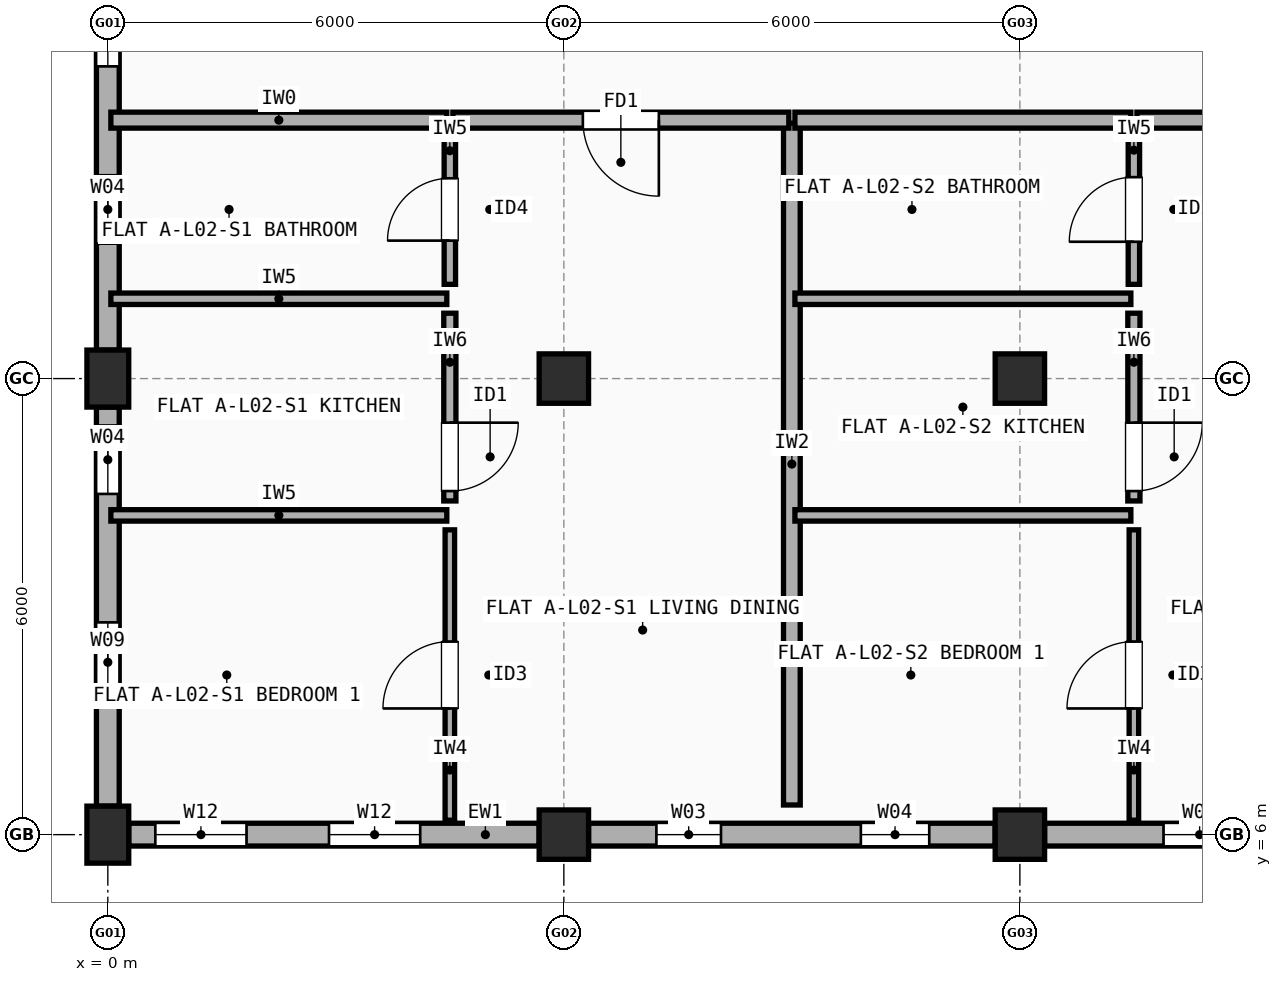
"""IFC4 building model, lengths in metres.
Left out: names, types, materials, properties, quantities, classifications, styles, units other than length and angle.
Written with IfcOpenShell. Run it as: python <this file> out.ifc"""

import sys

from ifc_helpers import new_model, si_unit, direction, frame, frame_2d, origin, origin_2d, place, context, subcontext, project, spatial, rectangle, extrude, element, fill, save


model = new_model("IFC4")
c1 = context("Model", 3, precision=1e-05, world=origin(), true_north=direction((0.0, 1.0)))
c2 = subcontext(c1, "Body", "Model", "MODEL_VIEW")
j1 = project(units=[si_unit("LENGTHUNIT", "METRE"), si_unit("PLANEANGLEUNIT", "RADIAN")], contexts=[c1])
p1 = place(None, origin())
s1 = spatial("IfcSite", under=j1, at=p1, CompositionType="ELEMENT")
p2 = place(p1, origin())
s2 = spatial("IfcBuilding", under=s1, at=p2, CompositionType="ELEMENT")
p3 = place(p2, frame((0.0, 0.0, 7.7)))
s3 = spatial("IfcBuildingStorey", under=s2, at=p3, CompositionType="ELEMENT", Elevation=7.7)
for number, where, z_axis, x_axis in (
    (1, (0.0, 6.0, 0.0), (0.0, 0.0, 1.0), (1.0, 0.0, 0.0)),
    (2, (0.0, 12.0, 0.0), (0.0, 0.0, 1.0), (1.0, 0.0, 0.0)),
):
    element("IfcColumn", number, at=place(p3, frame(where, z_axis=z_axis, x_axis=x_axis)), inside=s3, PredefinedType="COLUMN", context=c2, shape_type="SweptSolid", body=[
        extrude(rectangle(XDim=0.55, YDim=0.75, at=origin_2d()), origin(), (0.0, 0.0, 1.0), 2.955),
    ])
for number, where, z_axis, x_axis in (
    (3, (6.0, 6.0, 0.0), (0.0, 0.0, 1.0), (1.0, 0.0, 0.0)),
    (4, (6.0, 12.0, 0.0), (0.0, 0.0, 1.0), (1.0, 0.0, 0.0)),
    (5, (12.0, 6.0, 0.0), (0.0, 0.0, 1.0), (1.0, 0.0, 0.0)),
    (6, (12.0, 12.0, 0.0), (0.0, 0.0, 1.0), (1.0, 0.0, 0.0)),
):
    element("IfcColumn", number, at=place(p3, frame(where, z_axis=z_axis, x_axis=x_axis)), inside=s3, PredefinedType="COLUMN", context=c2, shape_type="SweptSolid", body=[
        extrude(rectangle(XDim=0.65, YDim=0.65, at=origin_2d()), origin(), (0.0, 0.0, 1.0), 2.955),
    ])
p4 = place(p3, frame((0.275, 6.0, 0.0), z_axis=(0.0, 0.0, 1.0), x_axis=(1.0, 0.0, 0.0)))
e7 = element("IfcWall", 7, at=p4, inside=s3, PredefinedType="STANDARD", context=c2, shape_type="SweptSolid", body=[
    extrude(rectangle(XDim=5.4, YDim=0.3, at=frame_2d((2.7, 0.0))), origin(), (0.0, 0.0, 1.0), 2.437),
])
p5 = place(p4, frame((0.35, 0.0, 0.9)))
e8 = element("IfcOpeningElement", 8, at=p5, cuts=e7, PredefinedType="OPENING", context=c2, shape_type="SweptSolid", body=[
    extrude(rectangle(XDim=1.2, YDim=1.35, at=frame_2d((0.6, 0.675))), frame((0.0, 0.16, 0.0), z_axis=(0.0, -1.0, 0.0), x_axis=(1.0, 0.0, 0.0)), (0.0, 0.0, 1.0), 0.32),
])
p6 = place(p4, frame((2.635, 0.0, 0.9)))
e9 = element("IfcOpeningElement", 9, at=p6, cuts=e7, PredefinedType="OPENING", context=c2, shape_type="SweptSolid", body=[
    extrude(rectangle(XDim=1.2, YDim=1.35, at=frame_2d((0.6, 0.675))), frame((0.0, 0.16, 0.0), z_axis=(0.0, -1.0, 0.0), x_axis=(1.0, 0.0, 0.0)), (0.0, 0.0, 1.0), 0.32),
])
p7 = place(p3, frame((6.325, 6.0, 0.0), z_axis=(0.0, 0.0, 1.0), x_axis=(1.0, 0.0, 0.0)))
e10 = element("IfcWall", 10, at=p7, inside=s3, PredefinedType="STANDARD", context=c2, shape_type="SweptSolid", body=[
    extrude(rectangle(XDim=5.35, YDim=0.3, at=frame_2d((2.675, 0.0))), origin(), (0.0, 0.0, 1.0), 2.437),
])
p8 = place(p7, frame((0.893, 0.0, 0.9)))
e11 = element("IfcOpeningElement", 11, at=p8, cuts=e10, PredefinedType="OPENING", context=c2, shape_type="SweptSolid", body=[
    extrude(rectangle(XDim=0.85, YDim=1.25, at=frame_2d((0.425, 0.625))), frame((0.0, 0.16, 0.0), z_axis=(0.0, -1.0, 0.0), x_axis=(1.0, 0.0, 0.0)), (0.0, 0.0, 1.0), 0.32),
])
p9 = place(p7, frame((3.583, 0.0, 0.9)))
e12 = element("IfcOpeningElement", 12, at=p9, cuts=e10, PredefinedType="OPENING", context=c2, shape_type="SweptSolid", body=[
    extrude(rectangle(XDim=0.9, YDim=1.3, at=frame_2d((0.45, 0.65))), frame((0.0, 0.16, 0.0), z_axis=(0.0, -1.0, 0.0), x_axis=(1.0, 0.0, 0.0)), (0.0, 0.0, 1.0), 0.32),
])
p10 = place(p3, frame((12.325, 6.0, 0.0), z_axis=(0.0, 0.0, 1.0), x_axis=(1.0, 0.0, 0.0)))
e13 = element("IfcWall", 13, at=p10, inside=s3, PredefinedType="STANDARD", context=c2, shape_type="SweptSolid", body=[
    extrude(rectangle(XDim=5.35, YDim=0.3, at=frame_2d((2.675, 0.0))), origin(), (0.0, 0.0, 1.0), 2.437),
])
p11 = place(p10, frame((1.565, 0.0, 0.9)))
e14 = element("IfcOpeningElement", 14, at=p11, cuts=e13, PredefinedType="OPENING", context=c2, shape_type="SweptSolid", body=[
    extrude(rectangle(XDim=0.95, YDim=1.35, at=frame_2d((0.475, 0.675))), frame((0.0, 0.16, 0.0), z_axis=(0.0, -1.0, 0.0), x_axis=(1.0, 0.0, 0.0)), (0.0, 0.0, 1.0), 0.32),
])
p12 = place(p10, frame((4.05, 0.0, 0.9)))
e15 = element("IfcOpeningElement", 15, at=p12, cuts=e13, PredefinedType="OPENING", context=c2, shape_type="SweptSolid", body=[
    extrude(rectangle(XDim=0.95, YDim=1.35, at=frame_2d((0.475, 0.675))), frame((0.0, 0.16, 0.0), z_axis=(0.0, -1.0, 0.0), x_axis=(1.0, 0.0, 0.0)), (0.0, 0.0, 1.0), 0.32),
])
p13 = place(p3, frame((0.0, 17.625, 0.0), z_axis=(0.0, 0.0, 1.0), x_axis=(0.0, -1.0, 0.0)))
e16 = element("IfcWall", 16, at=p13, inside=s3, PredefinedType="STANDARD", context=c2, shape_type="SweptSolid", body=[
    extrude(rectangle(XDim=5.25, YDim=0.3, at=frame_2d((2.625, 0.0))), origin(), (0.0, 0.0, 1.0), 2.437),
])
p14 = place(p13, frame((0.667, 0.0, 0.9)))
e17 = element("IfcOpeningElement", 17, at=p14, cuts=e16, PredefinedType="OPENING", context=c2, shape_type="SweptSolid", body=[
    extrude(rectangle(XDim=0.85, YDim=1.25, at=frame_2d((0.425, 0.625))), frame((0.0, 0.16, 0.0), z_axis=(0.0, -1.0, 0.0), x_axis=(1.0, 0.0, 0.0)), (0.0, 0.0, 1.0), 0.32),
])
p15 = place(p13, frame((2.95, 0.0, 0.9)))
e18 = element("IfcOpeningElement", 18, at=p15, cuts=e16, PredefinedType="OPENING", context=c2, shape_type="SweptSolid", body=[
    extrude(rectangle(XDim=0.9, YDim=1.3, at=frame_2d((0.45, 0.65))), frame((0.0, 0.16, 0.0), z_axis=(0.0, -1.0, 0.0), x_axis=(1.0, 0.0, 0.0)), (0.0, 0.0, 1.0), 0.32),
])
p16 = place(p3, frame((0.0, 11.625, 0.0), z_axis=(0.0, 0.0, 1.0), x_axis=(0.0, -1.0, 0.0)))
e19 = element("IfcWall", 19, at=p16, inside=s3, PredefinedType="STANDARD", context=c2, shape_type="SweptSolid", body=[
    extrude(rectangle(XDim=5.25, YDim=0.3, at=frame_2d((2.625, 0.0))), origin(), (0.0, 0.0, 1.0), 2.437),
])
p17 = place(p16, frame((0.242, 0.0, 0.9)))
e20 = element("IfcOpeningElement", 20, at=p17, cuts=e19, PredefinedType="OPENING", context=c2, shape_type="SweptSolid", body=[
    extrude(rectangle(XDim=0.9, YDim=1.3, at=frame_2d((0.45, 0.65))), frame((0.0, 0.16, 0.0), z_axis=(0.0, -1.0, 0.0), x_axis=(1.0, 0.0, 0.0)), (0.0, 0.0, 1.0), 0.32),
])
p18 = place(p16, frame((2.833, 0.0, 0.9)))
e21 = element("IfcOpeningElement", 21, at=p18, cuts=e19, PredefinedType="OPENING", context=c2, shape_type="SweptSolid", body=[
    extrude(rectangle(XDim=1.05, YDim=1.35, at=frame_2d((0.525, 0.675))), frame((0.0, 0.16, 0.0), z_axis=(0.0, -1.0, 0.0), x_axis=(1.0, 0.0, 0.0)), (0.0, 0.0, 1.0), 0.32),
])
p19 = place(p3, frame((9.0, 6.39, 0.0), z_axis=(0.0, 0.0, 1.0), x_axis=(0.0, 1.0, 0.0)))
e22 = element("IfcWall", 22, at=p19, inside=s3, PredefinedType="SOLIDWALL", context=c2, shape_type="SweptSolid", body=[
    extrude(rectangle(XDim=8.97, YDim=0.22, at=frame_2d((4.485, 0.0))), origin(), (0.0, 0.0, 1.0), 2.387),
])
p20 = place(p3, frame((0.04, 15.4, 0.0), z_axis=(0.0, 0.0, 1.0), x_axis=(1.0, 0.0, 0.0)))
e23 = element("IfcWall", 23, at=p20, inside=s3, PredefinedType="SOLIDWALL", context=c2, shape_type="SweptSolid", body=[
    extrude(rectangle(XDim=4.42, YDim=0.21, at=frame_2d((2.21, 0.0))), origin(), (0.0, 0.0, 1.0), 2.437),
])
p21 = place(p3, frame((4.54, 15.4, 0.0), z_axis=(0.0, 0.0, 1.0), x_axis=(1.0, 0.0, 0.0)))
e24 = element("IfcWall", 24, at=p21, inside=s3, PredefinedType="SOLIDWALL", context=c2, shape_type="SweptSolid", body=[
    extrude(rectangle(XDim=4.42, YDim=0.21, at=frame_2d((2.21, 0.0))), origin(), (0.0, 0.0, 1.0), 2.337),
])
p22 = place(p21, frame((1.71, 0.0, 0.0)))
e25 = element("IfcOpeningElement", 25, at=p22, cuts=e24, PredefinedType="OPENING", context=c2, shape_type="SweptSolid", body=[
    extrude(rectangle(XDim=1.0, YDim=2.15, at=frame_2d((0.5, 1.075))), frame((0.0, 0.115, 0.0), z_axis=(0.0, -1.0, 0.0), x_axis=(1.0, 0.0, 0.0)), (0.0, 0.0, 1.0), 0.23),
])
p23 = place(p3, frame((4.5, 6.19, 0.0), z_axis=(0.0, 0.0, 1.0), x_axis=(0.0, 1.0, 0.0)))
e26 = element("IfcWall", 26, at=p23, inside=s3, PredefinedType="PARTITIONING", context=c2, shape_type="SweptSolid", body=[
    extrude(rectangle(XDim=3.82, YDim=0.125, at=frame_2d((1.91, 0.0))), origin(), (0.0, 0.0, 1.0), 2.955),
])
p24 = place(p23, frame((1.47, 0.0, 0.0)))
e27 = element("IfcOpeningElement", 27, at=p24, cuts=e26, PredefinedType="OPENING", context=c2, shape_type="SweptSolid", body=[
    extrude(rectangle(XDim=0.88, YDim=2.1, at=frame_2d((0.44, 1.05))), frame((0.0, 0.073, 0.0), z_axis=(0.0, -1.0, 0.0), x_axis=(1.0, 0.0, 0.0)), (0.0, 0.0, 1.0), 0.145),
])
p25 = place(p3, frame((4.5, 10.39, 0.0), z_axis=(0.0, 0.0, 1.0), x_axis=(0.0, 1.0, 0.0)))
e28 = element("IfcWall", 28, at=p25, inside=s3, PredefinedType="PLUMBINGWALL", context=c2, shape_type="SweptSolid", body=[
    extrude(rectangle(XDim=2.47, YDim=0.16, at=frame_2d((1.235, 0.0))), origin(), (0.0, 0.0, 1.0), 2.387),
])
p26 = place(p25, frame((0.13, 0.0, 0.0)))
e29 = element("IfcOpeningElement", 29, at=p26, cuts=e28, PredefinedType="OPENING", context=c2, shape_type="SweptSolid", body=[
    extrude(rectangle(XDim=0.9, YDim=2.1, at=frame_2d((0.45, 1.05))), frame((0.0, 0.09, 0.0), z_axis=(0.0, -1.0, 0.0), x_axis=(1.0, 0.0, 0.0)), (0.0, 0.0, 1.0), 0.18),
])
p27 = place(p3, frame((4.5, 13.24, 0.0), z_axis=(0.0, 0.0, 1.0), x_axis=(0.0, 1.0, 0.0)))
e30 = element("IfcWall", 30, at=p27, inside=s3, PredefinedType="PARTITIONING", context=c2, shape_type="SweptSolid", body=[
    extrude(rectangle(XDim=1.97, YDim=0.15, at=frame_2d((0.985, 0.0))), origin(), (0.0, 0.0, 1.0), 2.955),
])
p28 = place(p27, frame((0.575, 0.0, 0.0)))
e31 = element("IfcOpeningElement", 31, at=p28, cuts=e30, PredefinedType="OPENING", context=c2, shape_type="SweptSolid", body=[
    extrude(rectangle(XDim=0.82, YDim=2.08, at=frame_2d((0.41, 1.04))), frame((0.0, 0.085, 0.0), z_axis=(0.0, -1.0, 0.0), x_axis=(1.0, 0.0, 0.0)), (0.0, 0.0, 1.0), 0.17),
])
for number, where, z_axis, x_axis in (
    (32, (0.04, 10.2, 0.0), (0.0, 0.0, 1.0), (1.0, 0.0, 0.0)),
    (33, (0.04, 13.05, 0.0), (0.0, 0.0, 1.0), (1.0, 0.0, 0.0)),
):
    element("IfcWall", number, at=place(p3, frame(where, z_axis=z_axis, x_axis=x_axis)), inside=s3, PredefinedType="PARTITIONING", context=c2, shape_type="SweptSolid", body=[
        extrude(rectangle(XDim=4.42, YDim=0.15, at=frame_2d((2.21, 0.0))), origin(), (0.0, 0.0, 1.0), 2.437),
    ])
p29 = place(p3, frame((9.04, 15.4, 0.0), z_axis=(0.0, 0.0, 1.0), x_axis=(1.0, 0.0, 0.0)))
e34 = element("IfcWall", 34, at=p29, inside=s3, PredefinedType="SOLIDWALL", context=c2, shape_type="SweptSolid", body=[
    extrude(rectangle(XDim=4.42, YDim=0.21, at=frame_2d((2.21, 0.0))), origin(), (0.0, 0.0, 1.0), 2.337),
])
p30 = place(p3, frame((13.54, 15.4, 0.0), z_axis=(0.0, 0.0, 1.0), x_axis=(1.0, 0.0, 0.0)))
e35 = element("IfcWall", 35, at=p30, inside=s3, PredefinedType="SOLIDWALL", context=c2, shape_type="SweptSolid", body=[
    extrude(rectangle(XDim=4.42, YDim=0.21, at=frame_2d((2.21, 0.0))), origin(), (0.0, 0.0, 1.0), 2.337),
])
p31 = place(p30, frame((1.72, 0.0, 0.0)))
e36 = element("IfcOpeningElement", 36, at=p31, cuts=e35, PredefinedType="OPENING", context=c2, shape_type="SweptSolid", body=[
    extrude(rectangle(XDim=0.98, YDim=2.15, at=frame_2d((0.49, 1.075))), frame((0.0, 0.115, 0.0), z_axis=(0.0, -1.0, 0.0), x_axis=(1.0, 0.0, 0.0)), (0.0, 0.0, 1.0), 0.23),
])
p32 = place(p3, frame((13.5, 6.19, 0.0), z_axis=(0.0, 0.0, 1.0), x_axis=(0.0, 1.0, 0.0)))
e37 = element("IfcWall", 37, at=p32, inside=s3, PredefinedType="PARTITIONING", context=c2, shape_type="SweptSolid", body=[
    extrude(rectangle(XDim=3.82, YDim=0.125, at=frame_2d((1.91, 0.0))), origin(), (0.0, 0.0, 1.0), 2.955),
])
p33 = place(p32, frame((1.47, 0.0, 0.0)))
e38 = element("IfcOpeningElement", 38, at=p33, cuts=e37, PredefinedType="OPENING", context=c2, shape_type="SweptSolid", body=[
    extrude(rectangle(XDim=0.88, YDim=2.1, at=frame_2d((0.44, 1.05))), frame((0.0, 0.073, 0.0), z_axis=(0.0, -1.0, 0.0), x_axis=(1.0, 0.0, 0.0)), (0.0, 0.0, 1.0), 0.145),
])
p34 = place(p3, frame((13.5, 10.39, 0.0), z_axis=(0.0, 0.0, 1.0), x_axis=(0.0, 1.0, 0.0)))
e39 = element("IfcWall", 39, at=p34, inside=s3, PredefinedType="PLUMBINGWALL", context=c2, shape_type="SweptSolid", body=[
    extrude(rectangle(XDim=2.47, YDim=0.16, at=frame_2d((1.235, 0.0))), origin(), (0.0, 0.0, 1.0), 2.387),
])
p35 = place(p34, frame((0.13, 0.0, 0.0)))
e40 = element("IfcOpeningElement", 40, at=p35, cuts=e39, PredefinedType="OPENING", context=c2, shape_type="SweptSolid", body=[
    extrude(rectangle(XDim=0.9, YDim=2.1, at=frame_2d((0.45, 1.05))), frame((0.0, 0.09, 0.0), z_axis=(0.0, -1.0, 0.0), x_axis=(1.0, 0.0, 0.0)), (0.0, 0.0, 1.0), 0.18),
])
p36 = place(p3, frame((13.5, 13.24, 0.0), z_axis=(0.0, 0.0, 1.0), x_axis=(0.0, 1.0, 0.0)))
e41 = element("IfcWall", 41, at=p36, inside=s3, PredefinedType="PARTITIONING", context=c2, shape_type="SweptSolid", body=[
    extrude(rectangle(XDim=1.97, YDim=0.15, at=frame_2d((0.985, 0.0))), origin(), (0.0, 0.0, 1.0), 2.955),
])
p37 = place(p36, frame((0.56, 0.0, 0.0)))
e42 = element("IfcOpeningElement", 42, at=p37, cuts=e41, PredefinedType="OPENING", context=c2, shape_type="SweptSolid", body=[
    extrude(rectangle(XDim=0.85, YDim=2.1, at=frame_2d((0.425, 1.05))), frame((0.0, 0.085, 0.0), z_axis=(0.0, -1.0, 0.0), x_axis=(1.0, 0.0, 0.0)), (0.0, 0.0, 1.0), 0.17),
])
for number, where, z_axis, x_axis in (
    (43, (9.04, 10.2, 0.0), (0.0, 0.0, 1.0), (1.0, 0.0, 0.0)),
    (44, (9.04, 13.05, 0.0), (0.0, 0.0, 1.0), (1.0, 0.0, 0.0)),
):
    element("IfcWall", number, at=place(p3, frame(where, z_axis=z_axis, x_axis=x_axis)), inside=s3, PredefinedType="PARTITIONING", context=c2, shape_type="SweptSolid", body=[
        extrude(rectangle(XDim=4.42, YDim=0.15, at=frame_2d((2.21, 0.0))), origin(), (0.0, 0.0, 1.0), 2.337),
    ])
p38 = place(p5, origin())
e45 = element("IfcWindow", 45, at=p38, inside=s3, PartitioningType="SINGLE_PANEL", PredefinedType="WINDOW", context=c2, shape_type="SweptSolid", body=[
    extrude(rectangle(XDim=1.2, YDim=1.35, at=frame_2d((0.6, 0.675))), frame((0.0, 0.03, 0.0), z_axis=(0.0, -1.0, 0.0), x_axis=(1.0, 0.0, 0.0)), (0.0, 0.0, 1.0), 0.06),
])
fill(e8, e45)
p39 = place(p6, origin())
e46 = element("IfcWindow", 46, at=p39, inside=s3, PartitioningType="SINGLE_PANEL", PredefinedType="WINDOW", context=c2, shape_type="SweptSolid", body=[
    extrude(rectangle(XDim=1.2, YDim=1.35, at=frame_2d((0.6, 0.675))), frame((0.0, 0.03, 0.0), z_axis=(0.0, -1.0, 0.0), x_axis=(1.0, 0.0, 0.0)), (0.0, 0.0, 1.0), 0.06),
])
fill(e9, e46)
p40 = place(p8, origin())
e47 = element("IfcWindow", 47, at=p40, inside=s3, PartitioningType="SINGLE_PANEL", PredefinedType="WINDOW", context=c2, shape_type="SweptSolid", body=[
    extrude(rectangle(XDim=0.85, YDim=1.25, at=frame_2d((0.425, 0.625))), frame((0.0, 0.03, 0.0), z_axis=(0.0, -1.0, 0.0), x_axis=(1.0, 0.0, 0.0)), (0.0, 0.0, 1.0), 0.06),
])
fill(e11, e47)
p41 = place(p9, origin())
e48 = element("IfcWindow", 48, at=p41, inside=s3, PartitioningType="SINGLE_PANEL", PredefinedType="WINDOW", context=c2, shape_type="SweptSolid", body=[
    extrude(rectangle(XDim=0.9, YDim=1.3, at=frame_2d((0.45, 0.65))), frame((0.0, 0.03, 0.0), z_axis=(0.0, -1.0, 0.0), x_axis=(1.0, 0.0, 0.0)), (0.0, 0.0, 1.0), 0.06),
])
fill(e12, e48)
p42 = place(p11, origin())
e49 = element("IfcWindow", 49, at=p42, inside=s3, PartitioningType="SINGLE_PANEL", PredefinedType="WINDOW", context=c2, shape_type="SweptSolid", body=[
    extrude(rectangle(XDim=0.95, YDim=1.35, at=frame_2d((0.475, 0.675))), frame((0.0, 0.03, 0.0), z_axis=(0.0, -1.0, 0.0), x_axis=(1.0, 0.0, 0.0)), (0.0, 0.0, 1.0), 0.06),
])
fill(e14, e49)
p43 = place(p14, origin())
e50 = element("IfcWindow", 50, at=p43, inside=s3, PartitioningType="SINGLE_PANEL", PredefinedType="WINDOW", context=c2, shape_type="SweptSolid", body=[
    extrude(rectangle(XDim=0.85, YDim=1.25, at=frame_2d((0.425, 0.625))), frame((0.0, 0.03, 0.0), z_axis=(0.0, -1.0, 0.0), x_axis=(1.0, 0.0, 0.0)), (0.0, 0.0, 1.0), 0.06),
])
fill(e17, e50)
p44 = place(p15, origin())
e51 = element("IfcWindow", 51, at=p44, inside=s3, PartitioningType="SINGLE_PANEL", PredefinedType="WINDOW", context=c2, shape_type="SweptSolid", body=[
    extrude(rectangle(XDim=0.9, YDim=1.3, at=frame_2d((0.45, 0.65))), frame((0.0, 0.03, 0.0), z_axis=(0.0, -1.0, 0.0), x_axis=(1.0, 0.0, 0.0)), (0.0, 0.0, 1.0), 0.06),
])
fill(e18, e51)
p45 = place(p17, origin())
e52 = element("IfcWindow", 52, at=p45, inside=s3, PartitioningType="SINGLE_PANEL", PredefinedType="WINDOW", context=c2, shape_type="SweptSolid", body=[
    extrude(rectangle(XDim=0.9, YDim=1.3, at=frame_2d((0.45, 0.65))), frame((0.0, 0.03, 0.0), z_axis=(0.0, -1.0, 0.0), x_axis=(1.0, 0.0, 0.0)), (0.0, 0.0, 1.0), 0.06),
])
fill(e20, e52)
p46 = place(p18, origin())
e53 = element("IfcWindow", 53, at=p46, inside=s3, PartitioningType="SINGLE_PANEL", PredefinedType="WINDOW", context=c2, shape_type="SweptSolid", body=[
    extrude(rectangle(XDim=1.05, YDim=1.35, at=frame_2d((0.525, 0.675))), frame((0.0, 0.03, 0.0), z_axis=(0.0, -1.0, 0.0), x_axis=(1.0, 0.0, 0.0)), (0.0, 0.0, 1.0), 0.06),
])
fill(e21, e53)
p47 = place(p22, origin())
e54 = element("IfcDoor", 54, at=p47, inside=s3, OperationType="SINGLE_SWING_RIGHT", PredefinedType="DOOR", context=c2, shape_type="SweptSolid", body=[
    extrude(rectangle(XDim=1.0, YDim=2.15, at=frame_2d((0.5, 1.075))), frame((0.0, 0.025, 0.0), z_axis=(0.0, -1.0, 0.0), x_axis=(1.0, 0.0, 0.0)), (0.0, 0.0, 1.0), 0.05),
])
fill(e25, e54)
p48 = place(p24, origin())
e55 = element("IfcDoor", 55, at=p48, inside=s3, OperationType="SINGLE_SWING_LEFT", PredefinedType="DOOR", context=c2, shape_type="SweptSolid", body=[
    extrude(rectangle(XDim=0.88, YDim=2.1, at=frame_2d((0.44, 1.05))), frame((0.0, 0.025, 0.0), z_axis=(0.0, -1.0, 0.0), x_axis=(1.0, 0.0, 0.0)), (0.0, 0.0, 1.0), 0.05),
])
fill(e27, e55)
p49 = place(p26, origin())
e56 = element("IfcDoor", 56, at=p49, inside=s3, OperationType="SINGLE_SWING_RIGHT", PredefinedType="DOOR", context=c2, shape_type="SweptSolid", body=[
    extrude(rectangle(XDim=0.9, YDim=2.1, at=frame_2d((0.45, 1.05))), frame((0.0, 0.025, 0.0), z_axis=(0.0, -1.0, 0.0), x_axis=(1.0, 0.0, 0.0)), (0.0, 0.0, 1.0), 0.05),
])
fill(e29, e56)
p50 = place(p28, origin())
e57 = element("IfcDoor", 57, at=p50, inside=s3, OperationType="SINGLE_SWING_LEFT", PredefinedType="DOOR", context=c2, shape_type="SweptSolid", body=[
    extrude(rectangle(XDim=0.82, YDim=2.08, at=frame_2d((0.41, 1.04))), frame((0.0, 0.025, 0.0), z_axis=(0.0, -1.0, 0.0), x_axis=(1.0, 0.0, 0.0)), (0.0, 0.0, 1.0), 0.05),
])
fill(e31, e57)
p51 = place(p33, origin())
e58 = element("IfcDoor", 58, at=p51, inside=s3, OperationType="SINGLE_SWING_LEFT", PredefinedType="DOOR", context=c2, shape_type="SweptSolid", body=[
    extrude(rectangle(XDim=0.88, YDim=2.1, at=frame_2d((0.44, 1.05))), frame((0.0, 0.025, 0.0), z_axis=(0.0, -1.0, 0.0), x_axis=(1.0, 0.0, 0.0)), (0.0, 0.0, 1.0), 0.05),
])
fill(e38, e58)
p52 = place(p35, origin())
e59 = element("IfcDoor", 59, at=p52, inside=s3, OperationType="SINGLE_SWING_RIGHT", PredefinedType="DOOR", context=c2, shape_type="SweptSolid", body=[
    extrude(rectangle(XDim=0.9, YDim=2.1, at=frame_2d((0.45, 1.05))), frame((0.0, 0.025, 0.0), z_axis=(0.0, -1.0, 0.0), x_axis=(1.0, 0.0, 0.0)), (0.0, 0.0, 1.0), 0.05),
])
fill(e40, e59)
p53 = place(p37, origin())
e60 = element("IfcDoor", 60, at=p53, inside=s3, OperationType="SINGLE_SWING_LEFT", PredefinedType="DOOR", context=c2, shape_type="SweptSolid", body=[
    extrude(rectangle(XDim=0.85, YDim=2.1, at=frame_2d((0.425, 1.05))), frame((0.0, 0.025, 0.0), z_axis=(0.0, -1.0, 0.0), x_axis=(1.0, 0.0, 0.0)), (0.0, 0.0, 1.0), 0.05),
])
fill(e42, e60)
save(model, sys.argv[1])
